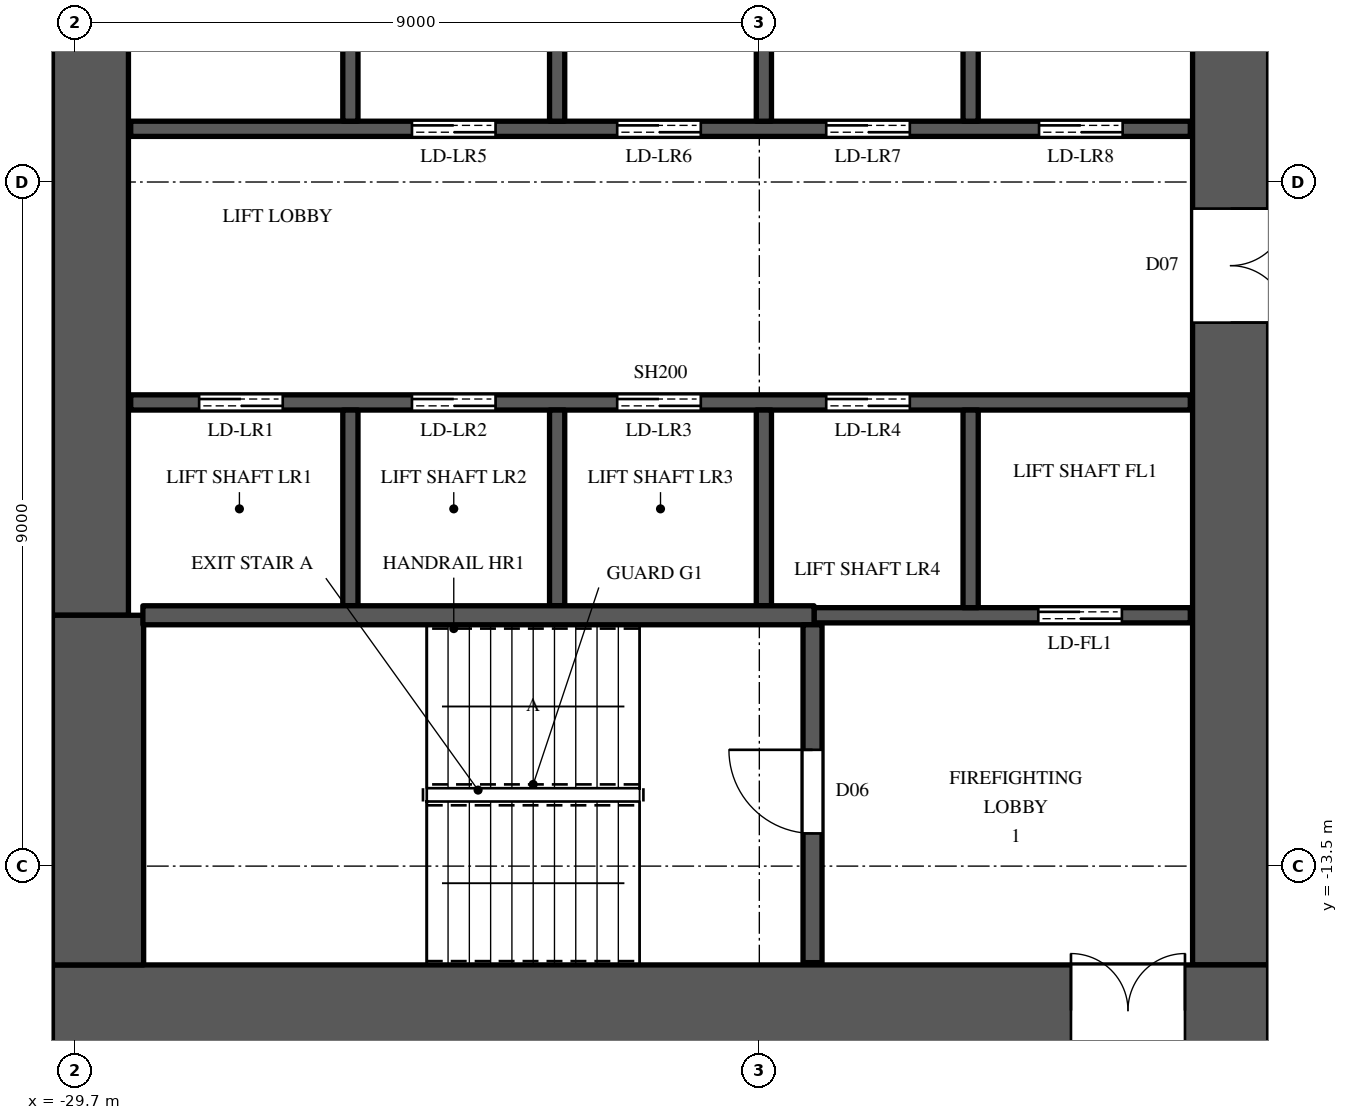
"""IFC4 building model, lengths in metres.
Left out: names, types, materials, properties, quantities, classifications, styles, units other than length and angle.
Written with IfcOpenShell. Run it as: python <this file> out.ifc"""

import sys

from ifc_helpers import new_model, si_unit, direction, frame, frame_2d, origin, place, context, subcontext, project, spatial, rectangle, extrude, element, fill, save


model = new_model("IFC4")
c1 = context("Model", 3, precision=1e-05, world=origin(), true_north=direction((0.0, 1.0)))
c2 = subcontext(c1, "Body", "Model", "MODEL_VIEW")
j1 = project(units=[si_unit("LENGTHUNIT", "METRE"), si_unit("PLANEANGLEUNIT", "RADIAN")], contexts=[c1])
p1 = place(None, origin())
s1 = spatial("IfcSite", under=j1, at=p1, CompositionType="ELEMENT")
p2 = place(p1, origin())
s2 = spatial("IfcBuilding", under=s1, at=p2, CompositionType="ELEMENT")
p3 = place(p2, frame((0.0, 0.0, 98.7)))
s3 = spatial("IfcBuildingStorey", under=s2, at=p3, CompositionType="ELEMENT", Elevation=98.7)
p4 = place(p3, frame((-30.0, -15.4, 0.0), z_axis=(0.0, 0.0, 1.0), x_axis=(1.0, 0.0, 0.0)))
e1 = element("IfcWall", 1, at=p4, inside=s3, PredefinedType="SHEAR", context=c2, shape_type="SweptSolid", body=[
    extrude(rectangle(XDim=16.0, YDim=1.2, at=frame_2d((8.0, 0.0))), origin(), (0.0, 0.0, 1.0), 3.6),
])
p5 = place(p4, frame((13.4, 0.0, 0.0)))
e2 = element("IfcOpeningElement", 2, at=p5, cuts=e1, PredefinedType="OPENING", context=c2, shape_type="SweptSolid", body=[
    extrude(rectangle(XDim=1.5, YDim=2.4, at=frame_2d((0.75, 1.2))), frame((0.0, 0.61, 0.0), z_axis=(0.0, -1.0, 0.0), x_axis=(1.0, 0.0, 0.0)), (0.0, 0.0, 1.0), 1.22),
])
p6 = place(p3, frame((-14.5, -14.8, 0.0), z_axis=(0.0, 0.0, 1.0), x_axis=(0.0, 1.0, 0.0)))
e3 = element("IfcWall", 3, at=p6, inside=s3, PredefinedType="SHEAR", context=c2, shape_type="SweptSolid", body=[
    extrude(rectangle(XDim=29.6, YDim=1.0, at=frame_2d((14.8, 0.0))), origin(), (0.0, 0.0, 1.0), 3.6),
])
p7 = place(p6, frame((8.45, 0.0, 0.0)))
e4 = element("IfcOpeningElement", 4, at=p7, cuts=e3, PredefinedType="OPENING", context=c2, shape_type="SweptSolid", body=[
    extrude(rectangle(XDim=1.5, YDim=2.4, at=frame_2d((0.75, 1.2))), frame((0.0, 0.51, 0.0), z_axis=(0.0, -1.0, 0.0), x_axis=(1.0, 0.0, 0.0)), (0.0, 0.0, 1.0), 1.02),
])
p8 = place(p6, frame((19.65, 0.0, 0.0)))
e5 = element("IfcOpeningElement", 5, at=p8, cuts=e3, PredefinedType="OPENING", context=c2, shape_type="SweptSolid", body=[
    extrude(rectangle(XDim=1.5, YDim=2.4, at=frame_2d((0.75, 1.2))), frame((0.0, 0.51, 0.0), z_axis=(0.0, -1.0, 0.0), x_axis=(1.0, 0.0, 0.0)), (0.0, 0.0, 1.0), 1.02),
])
p9 = place(p6, frame((14.5, 0.0, 0.0)))
e6 = element("IfcOpeningElement", 6, at=p9, cuts=e3, PredefinedType="OPENING", context=c2, shape_type="SweptSolid", body=[
    extrude(rectangle(XDim=0.6, YDim=2.0, at=frame_2d((0.3, 1.0))), frame((0.0, 0.51, 0.0), z_axis=(0.0, -1.0, 0.0), x_axis=(1.0, 0.0, 0.0)), (0.0, 0.0, 1.0), 1.02),
])
p10 = place(p3, frame((-29.5, -10.2, 0.0), z_axis=(0.0, 0.0, 1.0), x_axis=(0.0, 1.0, 0.0)))
e7 = element("IfcWall", 7, at=p10, inside=s3, PredefinedType="SHEAR", context=c2, shape_type="SweptSolid", body=[
    extrude(rectangle(XDim=20.4, YDim=1.0, at=frame_2d((10.2, 0.0))), origin(), (0.0, 0.0, 1.0), 3.6),
])
p11 = place(p3, frame((-29.4, -14.8, 0.0), z_axis=(0.0, 0.0, 1.0), x_axis=(0.0, 1.0, 0.0)))
e8 = element("IfcWall", 8, at=p11, inside=s3, PredefinedType="SHEAR", context=c2, shape_type="SweptSolid", body=[
    extrude(rectangle(XDim=4.6, YDim=1.2, at=frame_2d((2.3, 0.0))), origin(), (0.0, 0.0, 1.0), 3.6),
])
p12 = place(p3, frame((-28.97, -7.4, 0.0), z_axis=(0.0, 0.0, 1.0), x_axis=(1.0, 0.0, 0.0)))
e9 = element("IfcWall", 9, at=p12, inside=s3, PredefinedType="SHEAR", context=c2, shape_type="SweptSolid", body=[
    extrude(rectangle(XDim=13.94, YDim=0.2, at=frame_2d((6.97, 0.0))), origin(), (0.0, 0.0, 1.0), 3.3),
])
p13 = place(p12, frame((0.9, 0.0, 0.0)))
e10 = element("IfcOpeningElement", 10, at=p13, cuts=e9, PredefinedType="OPENING", context=c2, shape_type="SweptSolid", body=[
    extrude(rectangle(XDim=1.1, YDim=2.2, at=frame_2d((0.55, 1.1))), frame((0.0, 0.11, 0.0), z_axis=(0.0, -1.0, 0.0), x_axis=(1.0, 0.0, 0.0)), (0.0, 0.0, 1.0), 0.22),
])
p14 = place(p12, frame((3.7, 0.0, 0.0)))
e11 = element("IfcOpeningElement", 11, at=p14, cuts=e9, PredefinedType="OPENING", context=c2, shape_type="SweptSolid", body=[
    extrude(rectangle(XDim=1.1, YDim=2.2, at=frame_2d((0.55, 1.1))), frame((0.0, 0.11, 0.0), z_axis=(0.0, -1.0, 0.0), x_axis=(1.0, 0.0, 0.0)), (0.0, 0.0, 1.0), 0.22),
])
p15 = place(p12, frame((6.4, 0.0, 0.0)))
e12 = element("IfcOpeningElement", 12, at=p15, cuts=e9, PredefinedType="OPENING", context=c2, shape_type="SweptSolid", body=[
    extrude(rectangle(XDim=1.1, YDim=2.2, at=frame_2d((0.55, 1.1))), frame((0.0, 0.11, 0.0), z_axis=(0.0, -1.0, 0.0), x_axis=(1.0, 0.0, 0.0)), (0.0, 0.0, 1.0), 0.22),
])
p16 = place(p12, frame((9.15, 0.0, 0.0)))
e13 = element("IfcOpeningElement", 13, at=p16, cuts=e9, PredefinedType="OPENING", context=c2, shape_type="SweptSolid", body=[
    extrude(rectangle(XDim=1.1, YDim=2.2, at=frame_2d((0.55, 1.1))), frame((0.0, 0.11, 0.0), z_axis=(0.0, -1.0, 0.0), x_axis=(1.0, 0.0, 0.0)), (0.0, 0.0, 1.0), 0.22),
])
p17 = place(p3, frame((-28.97, -3.8, 0.0), z_axis=(0.0, 0.0, 1.0), x_axis=(1.0, 0.0, 0.0)))
e14 = element("IfcWall", 14, at=p17, inside=s3, PredefinedType="SHEAR", context=c2, shape_type="SweptSolid", body=[
    extrude(rectangle(XDim=13.94, YDim=0.2, at=frame_2d((6.97, 0.0))), origin(), (0.0, 0.0, 1.0), 3.3),
])
p18 = place(p17, frame((3.7, 0.0, 0.0)))
e15 = element("IfcOpeningElement", 15, at=p18, cuts=e14, PredefinedType="OPENING", context=c2, shape_type="SweptSolid", body=[
    extrude(rectangle(XDim=1.1, YDim=2.2, at=frame_2d((0.55, 1.1))), frame((0.0, 0.11, 0.0), z_axis=(0.0, -1.0, 0.0), x_axis=(1.0, 0.0, 0.0)), (0.0, 0.0, 1.0), 0.22),
])
p19 = place(p17, frame((6.4, 0.0, 0.0)))
e16 = element("IfcOpeningElement", 16, at=p19, cuts=e14, PredefinedType="OPENING", context=c2, shape_type="SweptSolid", body=[
    extrude(rectangle(XDim=1.1, YDim=2.2, at=frame_2d((0.55, 1.1))), frame((0.0, 0.11, 0.0), z_axis=(0.0, -1.0, 0.0), x_axis=(1.0, 0.0, 0.0)), (0.0, 0.0, 1.0), 0.22),
])
p20 = place(p17, frame((9.15, 0.0, 0.0)))
e17 = element("IfcOpeningElement", 17, at=p20, cuts=e14, PredefinedType="OPENING", context=c2, shape_type="SweptSolid", body=[
    extrude(rectangle(XDim=1.1, YDim=2.2, at=frame_2d((0.55, 1.1))), frame((0.0, 0.11, 0.0), z_axis=(0.0, -1.0, 0.0), x_axis=(1.0, 0.0, 0.0)), (0.0, 0.0, 1.0), 0.22),
])
p21 = place(p17, frame((11.95, 0.0, 0.0)))
e18 = element("IfcOpeningElement", 18, at=p21, cuts=e14, PredefinedType="OPENING", context=c2, shape_type="SweptSolid", body=[
    extrude(rectangle(XDim=1.1, YDim=2.2, at=frame_2d((0.55, 1.1))), frame((0.0, 0.11, 0.0), z_axis=(0.0, -1.0, 0.0), x_axis=(1.0, 0.0, 0.0)), (0.0, 0.0, 1.0), 0.22),
])
p22 = place(p3, frame((-26.08, -10.075, 0.0), z_axis=(0.0, 0.0, 1.0), x_axis=(0.0, 1.0, 0.0)))
e19 = element("IfcWall", 19, at=p22, inside=s3, PredefinedType="SHEAR", context=c2, shape_type="SweptSolid", body=[
    extrude(rectangle(XDim=2.575, YDim=0.2, at=frame_2d((1.288, 0.0))), origin(), (0.0, 0.0, 1.0), 3.6),
])
p23 = place(p3, frame((-26.08, -3.7, 0.0), z_axis=(0.0, 0.0, 1.0), x_axis=(0.0, 1.0, 0.0)))
e20 = element("IfcWall", 20, at=p23, inside=s3, PredefinedType="SHEAR", context=c2, shape_type="SweptSolid", body=[
    extrude(rectangle(XDim=2.6, YDim=0.2, at=frame_2d((1.3, 0.0))), origin(), (0.0, 0.0, 1.0), 3.6),
])
p24 = place(p3, frame((-23.36, -10.075, 0.0), z_axis=(0.0, 0.0, 1.0), x_axis=(0.0, 1.0, 0.0)))
e21 = element("IfcWall", 21, at=p24, inside=s3, PredefinedType="SHEAR", context=c2, shape_type="SweptSolid", body=[
    extrude(rectangle(XDim=2.575, YDim=0.2, at=frame_2d((1.288, 0.0))), origin(), (0.0, 0.0, 1.0), 3.6),
])
p25 = place(p3, frame((-23.36, -3.7, 0.0), z_axis=(0.0, 0.0, 1.0), x_axis=(0.0, 1.0, 0.0)))
e22 = element("IfcWall", 22, at=p25, inside=s3, PredefinedType="SHEAR", context=c2, shape_type="SweptSolid", body=[
    extrude(rectangle(XDim=2.6, YDim=0.2, at=frame_2d((1.3, 0.0))), origin(), (0.0, 0.0, 1.0), 3.6),
])
p26 = place(p3, frame((-20.64, -10.075, 0.0), z_axis=(0.0, 0.0, 1.0), x_axis=(0.0, 1.0, 0.0)))
e23 = element("IfcWall", 23, at=p26, inside=s3, PredefinedType="SHEAR", context=c2, shape_type="SweptSolid", body=[
    extrude(rectangle(XDim=2.575, YDim=0.2, at=frame_2d((1.288, 0.0))), origin(), (0.0, 0.0, 1.0), 3.6),
])
p27 = place(p3, frame((-20.64, -3.7, 0.0), z_axis=(0.0, 0.0, 1.0), x_axis=(0.0, 1.0, 0.0)))
e24 = element("IfcWall", 24, at=p27, inside=s3, PredefinedType="SHEAR", context=c2, shape_type="SweptSolid", body=[
    extrude(rectangle(XDim=2.6, YDim=0.2, at=frame_2d((1.3, 0.0))), origin(), (0.0, 0.0, 1.0), 3.6),
])
p28 = place(p3, frame((-19.98, -10.2, 0.0), z_axis=(0.0, 0.0, 1.0), x_axis=(1.0, 0.0, 0.0)))
e25 = element("IfcWall", 25, at=p28, inside=s3, PredefinedType="SHEAR", context=c2, shape_type="SweptSolid", body=[
    extrude(rectangle(XDim=4.95, YDim=0.2, at=frame_2d((2.475, 0.0))), origin(), (0.0, 0.0, 1.0), 3.3),
])
p29 = place(p28, frame((2.95, 0.0, 0.0)))
e26 = element("IfcOpeningElement", 26, at=p29, cuts=e25, PredefinedType="OPENING", context=c2, shape_type="SweptSolid", body=[
    extrude(rectangle(XDim=1.1, YDim=2.2, at=frame_2d((0.55, 1.1))), frame((0.0, 0.11, 0.0), z_axis=(0.0, -1.0, 0.0), x_axis=(1.0, 0.0, 0.0)), (0.0, 0.0, 1.0), 0.22),
])
p30 = place(p3, frame((-17.92, -10.1, 0.0), z_axis=(0.0, 0.0, 1.0), x_axis=(0.0, 1.0, 0.0)))
e27 = element("IfcWall", 27, at=p30, inside=s3, PredefinedType="SHEAR", context=c2, shape_type="SweptSolid", body=[
    extrude(rectangle(XDim=2.6, YDim=0.2, at=frame_2d((1.3, 0.0))), origin(), (0.0, 0.0, 1.0), 3.6),
])
p31 = place(p3, frame((-17.92, -3.7, 0.0), z_axis=(0.0, 0.0, 1.0), x_axis=(0.0, 1.0, 0.0)))
e28 = element("IfcWall", 28, at=p31, inside=s3, PredefinedType="SHEAR", context=c2, shape_type="SweptSolid", body=[
    extrude(rectangle(XDim=2.6, YDim=0.2, at=frame_2d((1.3, 0.0))), origin(), (0.0, 0.0, 1.0), 3.6),
])
p32 = place(p3, frame((-28.81, -10.2, 0.0), z_axis=(0.0, 0.0, 1.0), x_axis=(1.0, 0.0, 0.0)))
e29 = element("IfcWall", 29, at=p32, inside=s3, PredefinedType="SHEAR", context=c2, shape_type="SweptSolid", body=[
    extrude(rectangle(XDim=8.83, YDim=0.25, at=frame_2d((4.415, 0.0))), origin(), (0.0, 0.0, 1.0), 3.3),
])
p33 = place(p3, frame((-20.0, -14.77, 0.0), z_axis=(0.0, 0.0, 1.0), x_axis=(0.0, 1.0, 0.0)))
e30 = element("IfcWall", 30, at=p33, inside=s3, PredefinedType="SHEAR", context=c2, shape_type="SweptSolid", body=[
    extrude(rectangle(XDim=4.445, YDim=0.25, at=frame_2d((2.223, 0.0))), origin(), (0.0, 0.0, 1.0), 3.3),
])
p34 = place(p33, frame((1.7, 0.0, 0.0)))
e31 = element("IfcOpeningElement", 31, at=p34, cuts=e30, PredefinedType="OPENING", context=c2, shape_type="SweptSolid", body=[
    extrude(rectangle(XDim=1.1, YDim=2.2, at=frame_2d((0.55, 1.1))), frame((0.0, 0.135, 0.0), z_axis=(0.0, -1.0, 0.0), x_axis=(1.0, 0.0, 0.0)), (0.0, 0.0, 1.0), 0.27),
])
p35 = place(p34, origin())
e32 = element("IfcDoor", 32, at=p35, inside=s3, OperationType="SINGLE_SWING_RIGHT", PredefinedType="DOOR", context=c2, shape_type="SweptSolid", body=[
    extrude(rectangle(XDim=1.1, YDim=2.2, at=frame_2d((0.55, 1.1))), frame((0.0, 0.025, 0.0), z_axis=(0.0, -1.0, 0.0), x_axis=(1.0, 0.0, 0.0)), (0.0, 0.0, 1.0), 0.05),
])
fill(e31, e32)
p36 = place(p13, origin())
e33 = element("IfcDoor", 33, at=p36, inside=s3, OperationType="DOUBLE_DOOR_SLIDING", PredefinedType="DOOR", context=c2, shape_type="SweptSolid", body=[
    extrude(rectangle(XDim=1.1, YDim=2.2, at=frame_2d((0.55, 1.1))), frame((0.0, 0.025, 0.0), z_axis=(0.0, -1.0, 0.0), x_axis=(1.0, 0.0, 0.0)), (0.0, 0.0, 1.0), 0.05),
])
fill(e10, e33)
p37 = place(p14, origin())
e34 = element("IfcDoor", 34, at=p37, inside=s3, OperationType="DOUBLE_DOOR_SLIDING", PredefinedType="DOOR", context=c2, shape_type="SweptSolid", body=[
    extrude(rectangle(XDim=1.1, YDim=2.2, at=frame_2d((0.55, 1.1))), frame((0.0, 0.025, 0.0), z_axis=(0.0, -1.0, 0.0), x_axis=(1.0, 0.0, 0.0)), (0.0, 0.0, 1.0), 0.05),
])
fill(e11, e34)
p38 = place(p15, origin())
e35 = element("IfcDoor", 35, at=p38, inside=s3, OperationType="DOUBLE_DOOR_SLIDING", PredefinedType="DOOR", context=c2, shape_type="SweptSolid", body=[
    extrude(rectangle(XDim=1.1, YDim=2.2, at=frame_2d((0.55, 1.1))), frame((0.0, 0.025, 0.0), z_axis=(0.0, -1.0, 0.0), x_axis=(1.0, 0.0, 0.0)), (0.0, 0.0, 1.0), 0.05),
])
fill(e12, e35)
p39 = place(p16, origin())
e36 = element("IfcDoor", 36, at=p39, inside=s3, OperationType="DOUBLE_DOOR_SLIDING", PredefinedType="DOOR", context=c2, shape_type="SweptSolid", body=[
    extrude(rectangle(XDim=1.1, YDim=2.2, at=frame_2d((0.55, 1.1))), frame((0.0, 0.025, 0.0), z_axis=(0.0, -1.0, 0.0), x_axis=(1.0, 0.0, 0.0)), (0.0, 0.0, 1.0), 0.05),
])
fill(e13, e36)
p40 = place(p29, origin())
e37 = element("IfcDoor", 37, at=p40, inside=s3, OperationType="DOUBLE_DOOR_SLIDING", PredefinedType="DOOR", context=c2, shape_type="SweptSolid", body=[
    extrude(rectangle(XDim=1.1, YDim=2.2, at=frame_2d((0.55, 1.1))), frame((0.0, 0.025, 0.0), z_axis=(0.0, -1.0, 0.0), x_axis=(1.0, 0.0, 0.0)), (0.0, 0.0, 1.0), 0.05),
])
fill(e26, e37)
p41 = place(p18, origin())
e38 = element("IfcDoor", 38, at=p41, inside=s3, OperationType="DOUBLE_DOOR_SLIDING", PredefinedType="DOOR", context=c2, shape_type="SweptSolid", body=[
    extrude(rectangle(XDim=1.1, YDim=2.2, at=frame_2d((0.55, 1.1))), frame((0.0, 0.025, 0.0), z_axis=(0.0, -1.0, 0.0), x_axis=(1.0, 0.0, 0.0)), (0.0, 0.0, 1.0), 0.05),
])
fill(e15, e38)
p42 = place(p19, origin())
e39 = element("IfcDoor", 39, at=p42, inside=s3, OperationType="DOUBLE_DOOR_SLIDING", PredefinedType="DOOR", context=c2, shape_type="SweptSolid", body=[
    extrude(rectangle(XDim=1.1, YDim=2.2, at=frame_2d((0.55, 1.1))), frame((0.0, 0.025, 0.0), z_axis=(0.0, -1.0, 0.0), x_axis=(1.0, 0.0, 0.0)), (0.0, 0.0, 1.0), 0.05),
])
fill(e16, e39)
p43 = place(p20, origin())
e40 = element("IfcDoor", 40, at=p43, inside=s3, OperationType="DOUBLE_DOOR_SLIDING", PredefinedType="DOOR", context=c2, shape_type="SweptSolid", body=[
    extrude(rectangle(XDim=1.1, YDim=2.2, at=frame_2d((0.55, 1.1))), frame((0.0, 0.025, 0.0), z_axis=(0.0, -1.0, 0.0), x_axis=(1.0, 0.0, 0.0)), (0.0, 0.0, 1.0), 0.05),
])
fill(e17, e40)
p44 = place(p21, origin())
e41 = element("IfcDoor", 41, at=p44, inside=s3, OperationType="DOUBLE_DOOR_SLIDING", PredefinedType="DOOR", context=c2, shape_type="SweptSolid", body=[
    extrude(rectangle(XDim=1.1, YDim=2.2, at=frame_2d((0.55, 1.1))), frame((0.0, 0.025, 0.0), z_axis=(0.0, -1.0, 0.0), x_axis=(1.0, 0.0, 0.0)), (0.0, 0.0, 1.0), 0.05),
])
fill(e18, e41)
p45 = place(p5, origin())
e42 = element("IfcDoor", 42, at=p45, inside=s3, OperationType="DOUBLE_DOOR_SINGLE_SWING", PredefinedType="DOOR", context=c2, shape_type="SweptSolid", body=[
    extrude(rectangle(XDim=1.5, YDim=2.4, at=frame_2d((0.75, 1.2))), frame((0.0, 0.025, 0.0), z_axis=(0.0, -1.0, 0.0), x_axis=(1.0, 0.0, 0.0)), (0.0, 0.0, 1.0), 0.05),
])
fill(e2, e42)
p46 = place(p7, origin())
e43 = element("IfcDoor", 43, at=p46, inside=s3, OperationType="DOUBLE_DOOR_SINGLE_SWING", PredefinedType="DOOR", context=c2, shape_type="SweptSolid", body=[
    extrude(rectangle(XDim=1.5, YDim=2.4, at=frame_2d((0.75, 1.2))), frame((0.0, -0.445, 0.0), z_axis=(0.0, -1.0, 0.0), x_axis=(1.0, 0.0, 0.0)), (0.0, 0.0, 1.0), 0.05),
])
fill(e4, e43)
save(model, sys.argv[1])
